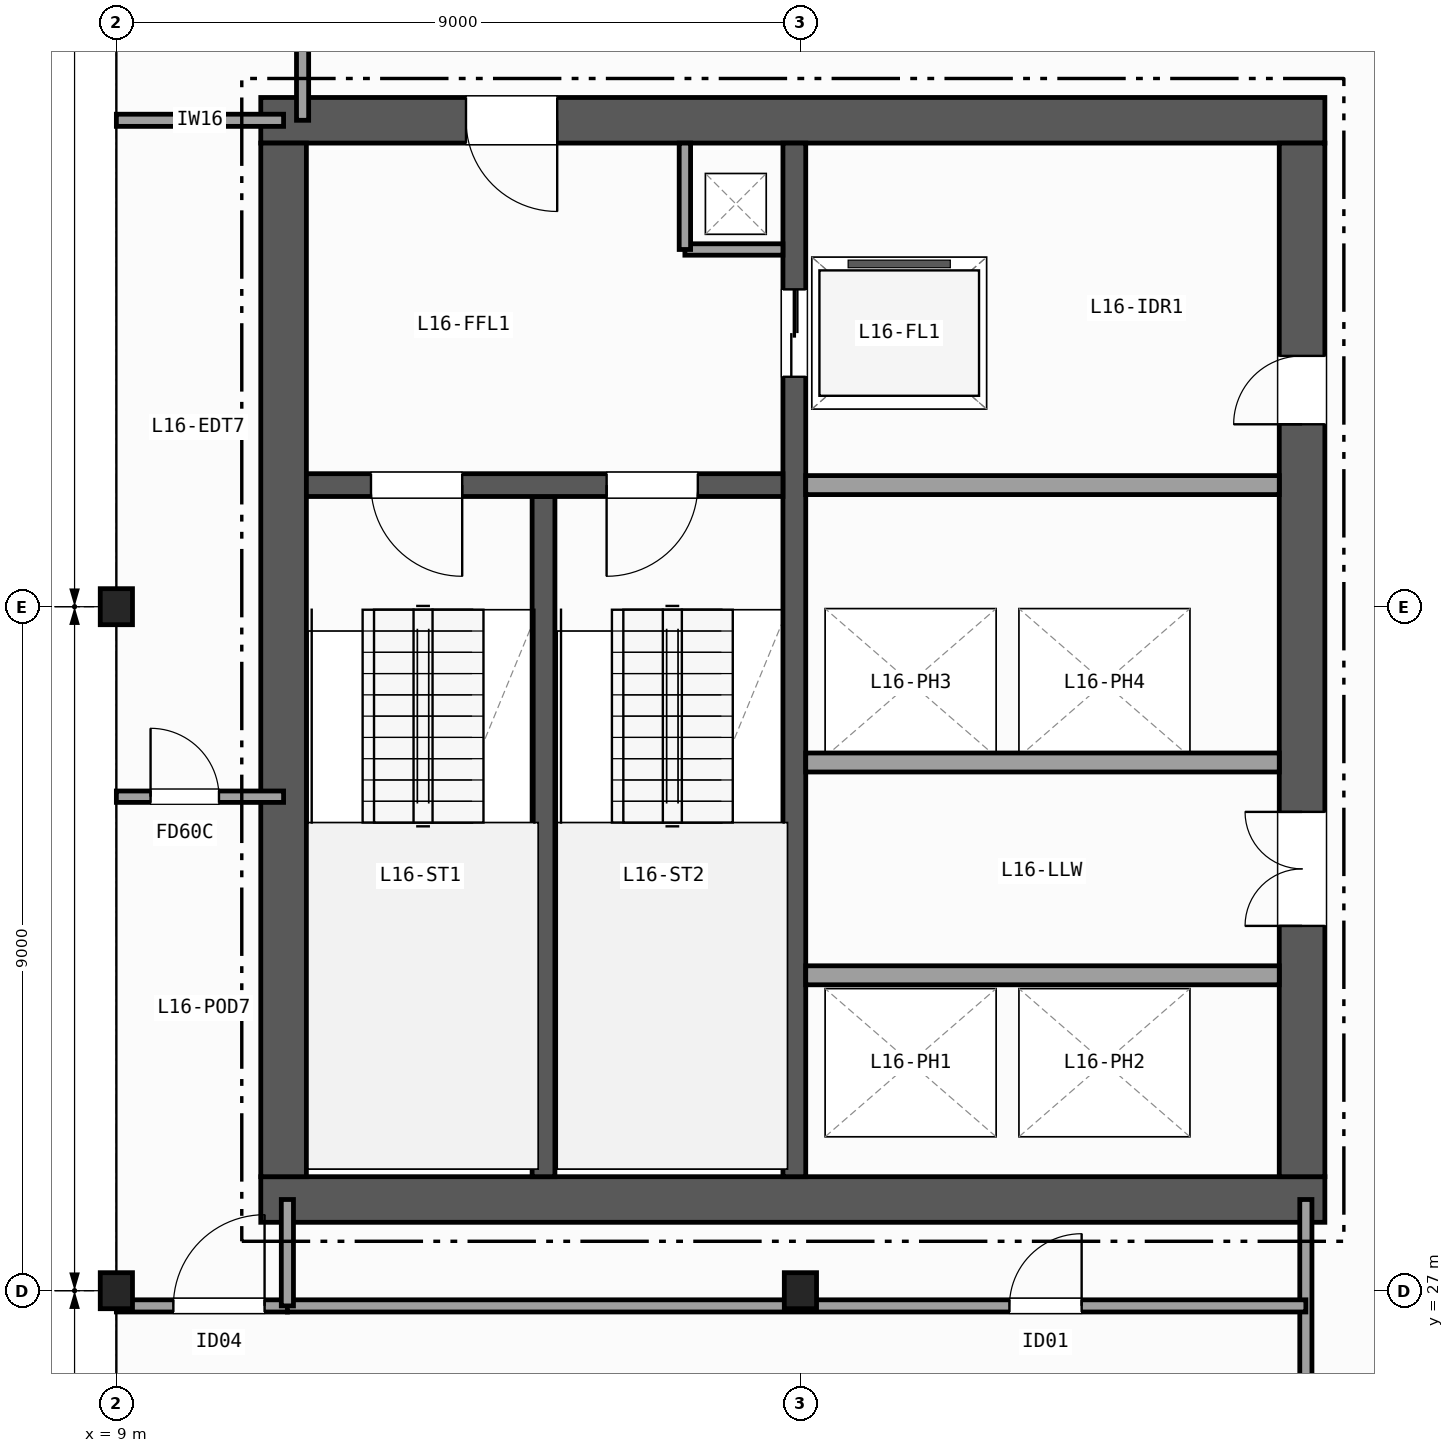
"""IFC4 building model, lengths in metres.
Left out: names, types, materials, properties, quantities, classifications, styles, units other than length and angle.
Written with IfcOpenShell. Run it as: python <this file> out.ifc"""

import sys

from ifc_helpers import new_model, si_unit, direction, frame, frame_2d, origin, origin_2d, place, context, subcontext, project, spatial, rectangle, i_section, extrude, element, fill, save


model = new_model("IFC4")
c1 = context("Model", 3, precision=1e-05, world=origin(), true_north=direction((0.0, 1.0)))
c2 = subcontext(c1, "Body", "Model", "MODEL_VIEW")
j1 = project(units=[si_unit("LENGTHUNIT", "METRE"), si_unit("PLANEANGLEUNIT", "RADIAN")], contexts=[c1])
p1 = place(None, origin())
s1 = spatial("IfcSite", under=j1, at=p1, CompositionType="ELEMENT")
p2 = place(p1, origin())
s2 = spatial("IfcBuilding", under=s1, at=p2, CompositionType="ELEMENT")
p3 = place(p2, frame((0.0, 0.0, 69.3)))
s3 = spatial("IfcBuildingStorey", under=s2, at=p3, CompositionType="ELEMENT", Elevation=69.3)
for number, where, z_axis, x_axis in (
    (1, (9.0, 27.0, 0.0), (0.0, 0.0, 1.0), (1.0, 0.0, 0.0)),
    (2, (9.0, 36.0, 0.0), (0.0, 0.0, 1.0), (1.0, 0.0, 0.0)),
    (3, (18.0, 27.0, 0.0), (0.0, 0.0, 1.0), (1.0, 0.0, 0.0)),
):
    element("IfcColumn", number, at=place(p3, frame(where, z_axis=z_axis, x_axis=x_axis)), inside=s3, PredefinedType="COLUMN", context=c2, shape_type="SweptSolid", body=[
        extrude(i_section(OverallWidth=0.424, OverallDepth=0.474, WebThickness=0.048, FlangeThickness=0.077, FilletRadius=0.015, at=origin_2d()), origin(), (0.0, 0.0, 1.0), 3.7),
    ])
p4 = place(p3, frame((10.9, 28.2, 0.0), z_axis=(0.0, 0.0, 1.0), x_axis=(1.0, 0.0, 0.0)))
e4 = element("IfcWall", 4, at=p4, inside=s3, PredefinedType="SHEAR", context=c2, shape_type="SweptSolid", body=[
    extrude(rectangle(XDim=14.0, YDim=0.6, at=frame_2d((7.0, 0.0))), origin(), (0.0, 0.0, 1.0), 3.42),
])
p5 = place(p3, frame((24.9, 42.4, 0.0), z_axis=(0.0, 0.0, 1.0), x_axis=(-1.0, 0.0, 0.0)))
e5 = element("IfcWall", 5, at=p5, inside=s3, PredefinedType="SHEAR", context=c2, shape_type="SweptSolid", body=[
    extrude(rectangle(XDim=14.0, YDim=0.6, at=frame_2d((7.0, 0.0))), origin(), (0.0, 0.0, 1.0), 3.42),
])
p6 = place(p5, frame((10.1, 0.0, 0.0)))
e6 = element("IfcOpeningElement", 6, at=p6, cuts=e5, PredefinedType="OPENING", context=c2, shape_type="SweptSolid", body=[
    extrude(rectangle(XDim=1.2, YDim=2.15, at=frame_2d((0.6, 1.075))), frame((0.0, 0.31, 0.0), z_axis=(0.0, -1.0, 0.0), x_axis=(1.0, 0.0, 0.0)), (0.0, 0.0, 1.0), 0.62),
])
p7 = place(p3, frame((11.2, 42.1, 0.0), z_axis=(0.0, 0.0, 1.0), x_axis=(0.0, -1.0, 0.0)))
e7 = element("IfcWall", 7, at=p7, inside=s3, PredefinedType="SHEAR", context=c2, shape_type="SweptSolid", body=[
    extrude(rectangle(XDim=13.6, YDim=0.6, at=frame_2d((6.8, 0.0))), origin(), (0.0, 0.0, 1.0), 3.42),
])
p8 = place(p3, frame((24.6, 28.5, 0.0), z_axis=(0.0, 0.0, 1.0), x_axis=(0.0, 1.0, 0.0)))
e8 = element("IfcWall", 8, at=p8, inside=s3, PredefinedType="SHEAR", context=c2, shape_type="SweptSolid", body=[
    extrude(rectangle(XDim=13.6, YDim=0.6, at=frame_2d((6.8, 0.0))), origin(), (0.0, 0.0, 1.0), 3.42),
])
p9 = place(p8, frame((3.3, 0.0, 0.0)))
e9 = element("IfcOpeningElement", 9, at=p9, cuts=e8, PredefinedType="OPENING", context=c2, shape_type="SweptSolid", body=[
    extrude(rectangle(XDim=1.5, YDim=2.2, at=frame_2d((0.75, 1.1))), frame((0.0, 0.31, 0.0), z_axis=(0.0, -1.0, 0.0), x_axis=(1.0, 0.0, 0.0)), (0.0, 0.0, 1.0), 0.62),
])
p10 = place(p8, frame((9.9, 0.0, 0.0)))
e10 = element("IfcOpeningElement", 10, at=p10, cuts=e8, PredefinedType="OPENING", context=c2, shape_type="SweptSolid", body=[
    extrude(rectangle(XDim=0.9, YDim=2.1, at=frame_2d((0.45, 1.05))), frame((0.0, 0.31, 0.0), z_axis=(0.0, -1.0, 0.0), x_axis=(1.0, 0.0, 0.0)), (0.0, 0.0, 1.0), 0.62),
])
p11 = place(p3, frame((14.62, 28.5, 0.0), z_axis=(0.0, 0.0, 1.0), x_axis=(0.0, 1.0, 0.0)))
e11 = element("IfcWall", 11, at=p11, inside=s3, PredefinedType="SHEAR", context=c2, shape_type="SweptSolid", body=[
    extrude(rectangle(XDim=8.95, YDim=0.3, at=frame_2d((4.475, 0.0))), origin(), (0.0, 0.0, 1.0), 3.42),
])
p12 = place(p3, frame((17.92, 42.1, 0.0), z_axis=(0.0, 0.0, 1.0), x_axis=(0.0, -1.0, 0.0)))
e12 = element("IfcWall", 12, at=p12, inside=s3, PredefinedType="SHEAR", context=c2, shape_type="SweptSolid", body=[
    extrude(rectangle(XDim=13.6, YDim=0.3, at=frame_2d((6.8, 0.0))), origin(), (0.0, 0.0, 1.0), 3.42),
])
p13 = place(p12, frame((1.925, 0.0, 0.0)))
e13 = element("IfcOpeningElement", 13, at=p13, cuts=e12, PredefinedType="OPENING", context=c2, shape_type="SweptSolid", body=[
    extrude(rectangle(XDim=1.15, YDim=2.15, at=frame_2d((0.575, 1.075))), frame((0.0, 0.16, 0.0), z_axis=(0.0, -1.0, 0.0), x_axis=(1.0, 0.0, 0.0)), (0.0, 0.0, 1.0), 0.32),
])
p14 = place(p3, frame((17.77, 37.6, 0.0), z_axis=(0.0, 0.0, 1.0), x_axis=(-1.0, 0.0, 0.0)))
e14 = element("IfcWall", 14, at=p14, inside=s3, PredefinedType="SHEAR", context=c2, shape_type="SweptSolid", body=[
    extrude(rectangle(XDim=6.27, YDim=0.3, at=frame_2d((3.135, 0.0))), origin(), (0.0, 0.0, 1.0), 3.42),
])
p15 = place(p14, frame((4.22, 0.0, 0.0)))
e15 = element("IfcOpeningElement", 15, at=p15, cuts=e14, PredefinedType="OPENING", context=c2, shape_type="SweptSolid", body=[
    extrude(rectangle(XDim=1.2, YDim=2.15, at=frame_2d((0.6, 1.075))), frame((0.0, 0.16, 0.0), z_axis=(0.0, -1.0, 0.0), x_axis=(1.0, 0.0, 0.0)), (0.0, 0.0, 1.0), 0.32),
])
p16 = place(p14, frame((1.12, 0.0, 0.0)))
e16 = element("IfcOpeningElement", 16, at=p16, cuts=e14, PredefinedType="OPENING", context=c2, shape_type="SweptSolid", body=[
    extrude(rectangle(XDim=1.2, YDim=2.15, at=frame_2d((0.6, 1.075))), frame((0.0, 0.16, 0.0), z_axis=(0.0, -1.0, 0.0), x_axis=(1.0, 0.0, 0.0)), (0.0, 0.0, 1.0), 0.32),
])
p17 = place(p3, frame((16.48, 40.7, 0.0), z_axis=(0.0, 0.0, 1.0), x_axis=(1.0, 0.0, 0.0)))
e17 = element("IfcWall", 17, at=p17, inside=s3, PredefinedType="PARTITIONING", context=c2, shape_type="SweptSolid", body=[
    extrude(rectangle(XDim=1.29, YDim=0.15, at=frame_2d((0.645, 0.0))), origin(), (0.0, 0.0, 1.0), 3.42),
])
p18 = place(p3, frame((16.48, 40.7, 0.0), z_axis=(0.0, 0.0, 1.0), x_axis=(0.0, 1.0, 0.0)))
e18 = element("IfcWall", 18, at=p18, inside=s3, PredefinedType="PARTITIONING", context=c2, shape_type="SweptSolid", body=[
    extrude(rectangle(XDim=1.4, YDim=0.15, at=frame_2d((0.7, 0.0))), origin(), (0.0, 0.0, 1.0), 3.42),
])
for number, where, z_axis, x_axis in (
    (19, (18.07, 37.6, 0.0), (0.0, 0.0, 1.0), (1.0, 0.0, 0.0)),
    (20, (18.07, 31.15, 0.0), (0.0, 0.0, 1.0), (1.0, 0.0, 0.0)),
    (21, (24.3, 33.95, 0.0), (0.0, 0.0, 1.0), (-1.0, 0.0, 0.0)),
):
    element("IfcWall", number, at=place(p3, frame(where, z_axis=z_axis, x_axis=x_axis)), inside=s3, PredefinedType="PARTITIONING", context=c2, shape_type="SweptSolid", body=[
        extrude(rectangle(XDim=6.23, YDim=0.25, at=frame_2d((3.115, 0.0))), origin(), (0.0, 0.0, 1.0), 3.42),
    ])
p19 = place(p3, frame((9.0, 26.8, 0.0), z_axis=(0.0, 0.0, 1.0), x_axis=(1.0, 0.0, 0.0)))
e22 = element("IfcWall", 22, at=p19, inside=s3, PredefinedType="PARTITIONING", context=c2, shape_type="SweptSolid", body=[
    extrude(rectangle(XDim=2.25, YDim=0.16, at=frame_2d((1.125, 0.0))), origin(), (0.0, 0.0, 1.0), 2.627),
])
p20 = place(p19, frame((0.75, 0.0, 0.0)))
e23 = element("IfcOpeningElement", 23, at=p20, cuts=e22, PredefinedType="OPENING", context=c2, shape_type="SweptSolid", body=[
    extrude(rectangle(XDim=1.2, YDim=2.15, at=frame_2d((0.6, 1.075))), frame((0.0, 0.09, 0.0), z_axis=(0.0, -1.0, 0.0), x_axis=(1.0, 0.0, 0.0)), (0.0, 0.0, 1.0), 0.18),
])
p21 = place(p3, frame((9.0, 42.4, 0.0), z_axis=(0.0, 0.0, 1.0), x_axis=(1.0, 0.0, 0.0)))
e24 = element("IfcWall", 24, at=p21, inside=s3, PredefinedType="PARTITIONING", context=c2, shape_type="SweptSolid", body=[
    extrude(rectangle(XDim=2.2, YDim=0.16, at=frame_2d((1.1, 0.0))), origin(), (0.0, 0.0, 1.0), 2.627),
])
p22 = place(p3, frame((11.45, 42.4, 0.0), z_axis=(0.0, 0.0, 1.0), x_axis=(0.0, 1.0, 0.0)))
e25 = element("IfcWall", 25, at=p22, inside=s3, PredefinedType="PARTITIONING", context=c2, shape_type="SweptSolid", body=[
    extrude(rectangle(XDim=2.1, YDim=0.16, at=frame_2d((1.05, 0.0))), origin(), (0.0, 0.0, 1.0), 3.42),
])
p23 = place(p3, frame((9.0, 33.5, 0.0), z_axis=(0.0, 0.0, 1.0), x_axis=(1.0, 0.0, 0.0)))
e26 = element("IfcWall", 26, at=p23, inside=s3, PredefinedType="PARTITIONING", context=c2, shape_type="SweptSolid", body=[
    extrude(rectangle(XDim=2.2, YDim=0.15, at=frame_2d((1.1, 0.0))), origin(), (0.0, 0.0, 1.0), 2.627),
])
p24 = place(p23, frame((0.45, 0.0, 0.0)))
e27 = element("IfcOpeningElement", 27, at=p24, cuts=e26, PredefinedType="OPENING", context=c2, shape_type="SweptSolid", body=[
    extrude(rectangle(XDim=0.9, YDim=2.1, at=frame_2d((0.45, 1.05))), frame((0.0, 0.085, 0.0), z_axis=(0.0, -1.0, 0.0), x_axis=(1.0, 0.0, 0.0)), (0.0, 0.0, 1.0), 0.17),
])
p25 = place(p3, frame((24.65, 9.0, 0.0), z_axis=(0.0, 0.0, 1.0), x_axis=(0.0, 1.0, 0.0)))
e28 = element("IfcWall", 28, at=p25, inside=s3, PredefinedType="PARTITIONING", context=c2, shape_type="SweptSolid", body=[
    extrude(rectangle(XDim=19.2, YDim=0.16, at=frame_2d((9.6, 0.0))), origin(), (0.0, 0.0, 1.0), 2.627),
])
p26 = place(p25, frame((12.2, 0.0, 0.0)))
e29 = element("IfcOpeningElement", 29, at=p26, cuts=e28, PredefinedType="OPENING", context=c2, shape_type="SweptSolid", body=[
    extrude(rectangle(XDim=1.0, YDim=2.1, at=frame_2d((0.5, 1.05))), frame((0.0, 0.09, 0.0), z_axis=(0.0, -1.0, 0.0), x_axis=(1.0, 0.0, 0.0)), (0.0, 0.0, 1.0), 0.18),
])
p27 = place(p25, frame((4.2, 0.0, 0.0)))
e30 = element("IfcOpeningElement", 30, at=p27, cuts=e28, PredefinedType="OPENING", context=c2, shape_type="SweptSolid", body=[
    extrude(rectangle(XDim=1.05, YDim=2.15, at=frame_2d((0.525, 1.075))), frame((0.0, 0.09, 0.0), z_axis=(0.0, -1.0, 0.0), x_axis=(1.0, 0.0, 0.0)), (0.0, 0.0, 1.0), 0.18),
])
p28 = place(p3, frame((11.25, 26.8, 0.0), z_axis=(0.0, 0.0, 1.0), x_axis=(1.0, 0.0, 0.0)))
e31 = element("IfcWall", 31, at=p28, inside=s3, PredefinedType="PARTITIONING", context=c2, shape_type="SweptSolid", body=[
    extrude(rectangle(XDim=13.4, YDim=0.16, at=frame_2d((6.7, 0.0))), origin(), (0.0, 0.0, 1.0), 2.789),
])
p29 = place(p28, frame((9.5, 0.0, 0.0)))
e32 = element("IfcOpeningElement", 32, at=p29, cuts=e31, PredefinedType="OPENING", context=c2, shape_type="SweptSolid", body=[
    extrude(rectangle(XDim=0.95, YDim=2.1, at=frame_2d((0.475, 1.05))), frame((0.0, 0.09, 0.0), z_axis=(0.0, -1.0, 0.0), x_axis=(1.0, 0.0, 0.0)), (0.0, 0.0, 1.0), 0.18),
])
p30 = place(p3, frame((11.25, 26.8, 0.0), z_axis=(0.0, 0.0, 1.0), x_axis=(0.0, 1.0, 0.0)))
e33 = element("IfcWall", 33, at=p30, inside=s3, PredefinedType="PARTITIONING", context=c2, shape_type="SweptSolid", body=[
    extrude(rectangle(XDim=1.4, YDim=0.16, at=frame_2d((0.7, 0.0))), origin(), (0.0, 0.0, 1.0), 2.789),
])
p31 = place(p15, origin())
e34 = element("IfcDoor", 34, at=p31, inside=s3, OperationType="SINGLE_SWING_LEFT", PredefinedType="DOOR", context=c2, shape_type="SweptSolid", body=[
    extrude(rectangle(XDim=1.2, YDim=2.15, at=frame_2d((0.6, 1.075))), frame((0.0, 0.025, 0.0), z_axis=(0.0, -1.0, 0.0), x_axis=(1.0, 0.0, 0.0)), (0.0, 0.0, 1.0), 0.05),
])
fill(e15, e34)
p32 = place(p16, origin())
e35 = element("IfcDoor", 35, at=p32, inside=s3, OperationType="SINGLE_SWING_RIGHT", PredefinedType="DOOR", context=c2, shape_type="SweptSolid", body=[
    extrude(rectangle(XDim=1.2, YDim=2.15, at=frame_2d((0.6, 1.075))), frame((0.0, 0.025, 0.0), z_axis=(0.0, -1.0, 0.0), x_axis=(1.0, 0.0, 0.0)), (0.0, 0.0, 1.0), 0.05),
])
fill(e16, e35)
p33 = place(p9, origin())
e36 = element("IfcDoor", 36, at=p33, inside=s3, OperationType="DOUBLE_DOOR_SINGLE_SWING", PredefinedType="DOOR", context=c2, shape_type="SweptSolid", body=[
    extrude(rectangle(XDim=1.5, YDim=2.2, at=frame_2d((0.75, 1.1))), frame((0.0, 0.025, 0.0), z_axis=(0.0, -1.0, 0.0), x_axis=(1.0, 0.0, 0.0)), (0.0, 0.0, 1.0), 0.05),
])
fill(e9, e36)
p34 = place(p6, origin())
e37 = element("IfcDoor", 37, at=p34, inside=s3, OperationType="SINGLE_SWING_LEFT", PredefinedType="DOOR", context=c2, shape_type="SweptSolid", body=[
    extrude(rectangle(XDim=1.2, YDim=2.15, at=frame_2d((0.6, 1.075))), frame((0.0, 0.025, 0.0), z_axis=(0.0, -1.0, 0.0), x_axis=(1.0, 0.0, 0.0)), (0.0, 0.0, 1.0), 0.05),
])
fill(e6, e37)
p35 = place(p10, origin())
e38 = element("IfcDoor", 38, at=p35, inside=s3, OperationType="SINGLE_SWING_LEFT", PredefinedType="DOOR", context=c2, shape_type="SweptSolid", body=[
    extrude(rectangle(XDim=0.9, YDim=2.1, at=frame_2d((0.45, 1.05))), frame((0.0, 0.025, 0.0), z_axis=(0.0, -1.0, 0.0), x_axis=(1.0, 0.0, 0.0)), (0.0, 0.0, 1.0), 0.05),
])
fill(e10, e38)
p36 = place(p13, origin())
e39 = element("IfcDoor", 39, at=p36, inside=s3, OperationType="DOUBLE_DOOR_SLIDING", PredefinedType="DOOR", context=c2, shape_type="SweptSolid", body=[
    extrude(rectangle(XDim=1.15, YDim=2.15, at=frame_2d((0.575, 1.075))), frame((0.0, 0.025, 0.0), z_axis=(0.0, -1.0, 0.0), x_axis=(1.0, 0.0, 0.0)), (0.0, 0.0, 1.0), 0.05),
])
fill(e13, e39)
p37 = place(p20, origin())
e40 = element("IfcDoor", 40, at=p37, inside=s3, OperationType="SINGLE_SWING_RIGHT", PredefinedType="DOOR", context=c2, shape_type="SweptSolid", body=[
    extrude(rectangle(XDim=1.2, YDim=2.15, at=frame_2d((0.6, 1.075))), frame((0.0, 0.025, 0.0), z_axis=(0.0, -1.0, 0.0), x_axis=(1.0, 0.0, 0.0)), (0.0, 0.0, 1.0), 0.05),
])
fill(e23, e40)
p38 = place(p24, origin())
e41 = element("IfcDoor", 41, at=p38, inside=s3, OperationType="SINGLE_SWING_LEFT", PredefinedType="DOOR", context=c2, shape_type="SweptSolid", body=[
    extrude(rectangle(XDim=0.9, YDim=2.1, at=frame_2d((0.45, 1.05))), frame((0.0, 0.025, 0.0), z_axis=(0.0, -1.0, 0.0), x_axis=(1.0, 0.0, 0.0)), (0.0, 0.0, 1.0), 0.05),
])
fill(e27, e41)
p39 = place(p29, origin())
e42 = element("IfcDoor", 42, at=p39, inside=s3, OperationType="SINGLE_SWING_RIGHT", PredefinedType="DOOR", context=c2, shape_type="SweptSolid", body=[
    extrude(rectangle(XDim=0.95, YDim=2.1, at=frame_2d((0.475, 1.05))), frame((0.0, 0.025, 0.0), z_axis=(0.0, -1.0, 0.0), x_axis=(1.0, 0.0, 0.0)), (0.0, 0.0, 1.0), 0.05),
])
fill(e32, e42)
save(model, sys.argv[1])
